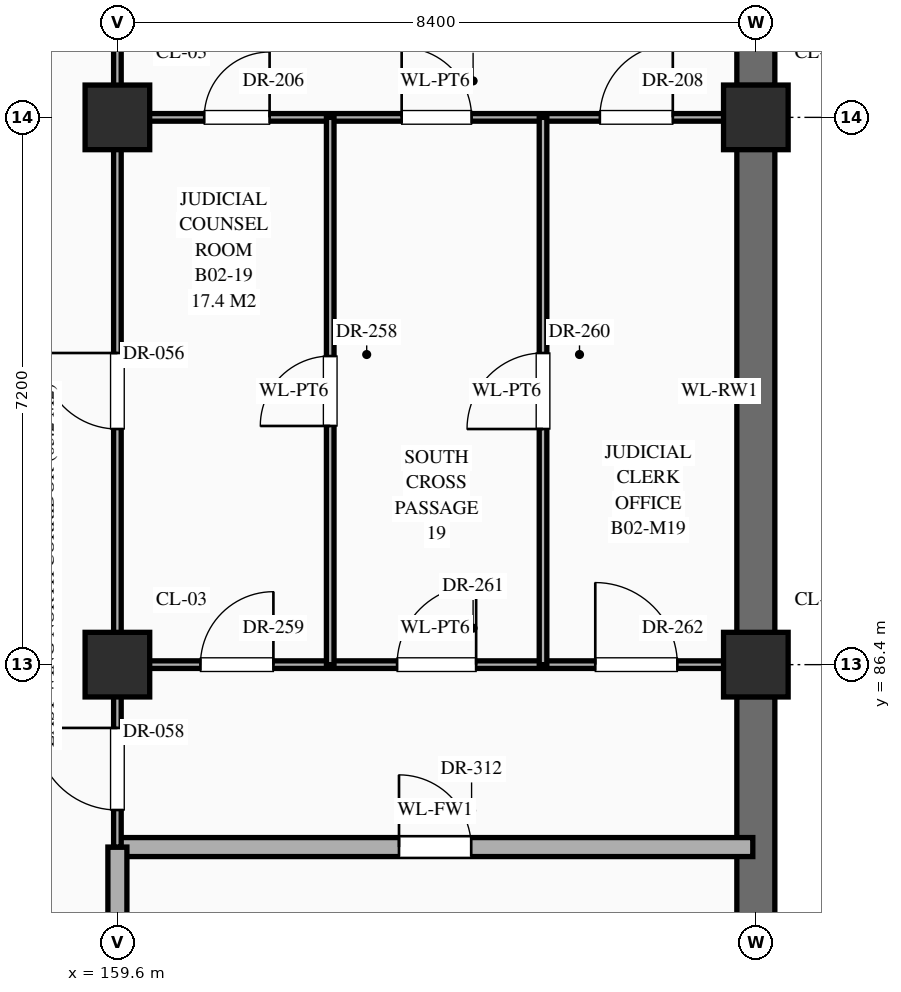
"""IFC4 building model, lengths in metres.
Left out: names, types, materials, properties, quantities, classifications, styles, units other than length and angle.
Written with IfcOpenShell. Run it as: python <this file> out.ifc"""

import sys

from ifc_helpers import new_model, si_unit, direction, frame, frame_2d, origin, origin_2d, place, context, subcontext, project, spatial, rectangle, extrude, element, fill, save


model = new_model("IFC4")
c1 = context("Model", 3, precision=1e-05, world=origin(), true_north=direction((0.0, 1.0)))
c2 = subcontext(c1, "Body", "Model", "MODEL_VIEW")
j1 = project(units=[si_unit("LENGTHUNIT", "METRE"), si_unit("PLANEANGLEUNIT", "RADIAN")], contexts=[c1])
p1 = place(None, origin())
s1 = spatial("IfcSite", under=j1, at=p1, CompositionType="ELEMENT")
p2 = place(p1, origin())
s2 = spatial("IfcBuilding", under=s1, at=p2, CompositionType="ELEMENT")
p3 = place(p2, frame((0.0, 0.0, -10.2)))
s3 = spatial("IfcBuildingStorey", under=s2, at=p3, CompositionType="ELEMENT", Elevation=-10.2)
for number, where, z_axis, x_axis in (
    (1, (159.6, 86.4, 0.0), (0.0, 0.0, 1.0), (1.0, 0.0, 0.0)),
    (2, (159.6, 93.6, 0.0), (0.0, 0.0, 1.0), (1.0, 0.0, 0.0)),
    (3, (168.0, 86.4, 0.0), (0.0, 0.0, 1.0), (1.0, 0.0, 0.0)),
    (4, (168.0, 93.6, 0.0), (0.0, 0.0, 1.0), (1.0, 0.0, 0.0)),
):
    element("IfcColumn", number, at=place(p3, frame(where, z_axis=z_axis, x_axis=x_axis)), inside=s3, PredefinedType="COLUMN", context=c2, shape_type="SweptSolid", body=[
        extrude(rectangle(XDim=0.85, YDim=0.85, at=origin_2d()), origin(), (0.0, 0.0, 1.0), 4.8),
    ])
for number, where, z_axis, x_axis in (
    (5, (168.0, 79.62, 0.0), (0.0, 0.0, 1.0), (0.0, 1.0, 0.0)),
    (6, (168.0, 86.82, 0.0), (0.0, 0.0, 1.0), (0.0, 1.0, 0.0)),
    (7, (168.0, 94.02, 0.0), (0.0, 0.0, 1.0), (0.0, 1.0, 0.0)),
):
    element("IfcWall", number, at=place(p3, frame(where, z_axis=z_axis, x_axis=x_axis)), inside=s3, PredefinedType="USERDEFINED", context=c2, shape_type="SweptSolid", body=[
        extrude(rectangle(XDim=6.36, YDim=0.5, at=frame_2d((3.18, 0.0))), origin(), (0.0, 0.0, 1.0), 4.48),
    ])
p4 = place(p3, frame((159.6, 84.0, 0.0), z_axis=(0.0, 0.0, 1.0), x_axis=(1.0, 0.0, 0.0)))
e8 = element("IfcWall", 8, at=p4, inside=s3, PredefinedType="STANDARD", context=c2, shape_type="SweptSolid", body=[
    extrude(rectangle(XDim=8.36, YDim=0.25, at=frame_2d((4.18, 0.0))), origin(), (0.0, 0.0, 1.0), 4.48),
])
p5 = place(p4, frame((3.705, 0.0, 0.0)))
e9 = element("IfcOpeningElement", 9, at=p5, cuts=e8, PredefinedType="OPENING", context=c2, shape_type="SweptSolid", body=[
    extrude(rectangle(XDim=0.95, YDim=2.15, at=frame_2d((0.475, 1.075))), frame((0.0, 0.137, 0.0), z_axis=(0.0, -1.0, 0.0), x_axis=(1.0, 0.0, 0.0)), (0.0, 0.0, 1.0), 0.274),
])
p6 = place(p3, frame((159.6, 86.4, 0.0), z_axis=(0.0, 0.0, 1.0), x_axis=(1.0, 0.0, 0.0)))
e10 = element("IfcWall", 10, at=p6, inside=s3, PredefinedType="STANDARD", context=c2, shape_type="SweptSolid", body=[
    extrude(rectangle(XDim=8.36, YDim=0.1, at=frame_2d((4.18, 0.0))), origin(), (0.0, 0.0, 1.0), 3.63),
])
p7 = place(p6, frame((1.093, 0.0, 0.0)))
e11 = element("IfcOpeningElement", 11, at=p7, cuts=e10, PredefinedType="OPENING", context=c2, shape_type="SweptSolid", body=[
    extrude(rectangle(XDim=0.96, YDim=2.2, at=frame_2d((0.48, 1.1))), frame((0.0, 0.062, 0.0), z_axis=(0.0, -1.0, 0.0), x_axis=(1.0, 0.0, 0.0)), (0.0, 0.0, 1.0), 0.124),
])
p8 = place(p6, frame((3.68, 0.0, 0.0)))
e12 = element("IfcOpeningElement", 12, at=p8, cuts=e10, PredefinedType="OPENING", context=c2, shape_type="SweptSolid", body=[
    extrude(rectangle(XDim=1.04, YDim=2.2, at=frame_2d((0.52, 1.1))), frame((0.0, 0.062, 0.0), z_axis=(0.0, -1.0, 0.0), x_axis=(1.0, 0.0, 0.0)), (0.0, 0.0, 1.0), 0.124),
])
p9 = place(p6, frame((6.288, 0.0, 0.0)))
e13 = element("IfcOpeningElement", 13, at=p9, cuts=e10, PredefinedType="OPENING", context=c2, shape_type="SweptSolid", body=[
    extrude(rectangle(XDim=1.08, YDim=2.25, at=frame_2d((0.54, 1.125))), frame((0.0, 0.062, 0.0), z_axis=(0.0, -1.0, 0.0), x_axis=(1.0, 0.0, 0.0)), (0.0, 0.0, 1.0), 0.124),
])
p10 = place(p3, frame((159.6, 93.6, 0.0), z_axis=(0.0, 0.0, 1.0), x_axis=(1.0, 0.0, 0.0)))
e14 = element("IfcWall", 14, at=p10, inside=s3, PredefinedType="STANDARD", context=c2, shape_type="SweptSolid", body=[
    extrude(rectangle(XDim=8.36, YDim=0.1, at=frame_2d((4.18, 0.0))), origin(), (0.0, 0.0, 1.0), 3.63),
])
p11 = place(p10, frame((1.143, 0.0, 0.0)))
e15 = element("IfcOpeningElement", 15, at=p11, cuts=e14, PredefinedType="OPENING", context=c2, shape_type="SweptSolid", body=[
    extrude(rectangle(XDim=0.86, YDim=2.1, at=frame_2d((0.43, 1.05))), frame((0.0, 0.062, 0.0), z_axis=(0.0, -1.0, 0.0), x_axis=(1.0, 0.0, 0.0)), (0.0, 0.0, 1.0), 0.124),
])
p12 = place(p10, frame((3.74, 0.0, 0.0)))
e16 = element("IfcOpeningElement", 16, at=p12, cuts=e14, PredefinedType="OPENING", context=c2, shape_type="SweptSolid", body=[
    extrude(rectangle(XDim=0.92, YDim=2.15, at=frame_2d((0.46, 1.075))), frame((0.0, 0.062, 0.0), z_axis=(0.0, -1.0, 0.0), x_axis=(1.0, 0.0, 0.0)), (0.0, 0.0, 1.0), 0.124),
])
p13 = place(p10, frame((6.347, 0.0, 0.0)))
e17 = element("IfcOpeningElement", 17, at=p13, cuts=e14, PredefinedType="OPENING", context=c2, shape_type="SweptSolid", body=[
    extrude(rectangle(XDim=0.96, YDim=2.2, at=frame_2d((0.48, 1.1))), frame((0.0, 0.062, 0.0), z_axis=(0.0, -1.0, 0.0), x_axis=(1.0, 0.0, 0.0)), (0.0, 0.0, 1.0), 0.124),
])
p14 = place(p3, frame((159.6, 40.8, 0.0), z_axis=(0.0, 0.0, 1.0), x_axis=(0.0, 1.0, 0.0)))
e18 = element("IfcWall", 18, at=p14, inside=s3, PredefinedType="STANDARD", context=c2, shape_type="SweptSolid", body=[
    extrude(rectangle(XDim=43.2, YDim=0.25, at=frame_2d((21.6, 0.0))), origin(), (0.0, 0.0, 1.0), 3.73),
])
p15 = place(p14, frame((0.478, 0.0, 0.0)))
e19 = element("IfcOpeningElement", 19, at=p15, cuts=e18, PredefinedType="OPENING", context=c2, shape_type="SweptSolid", body=[
    extrude(rectangle(XDim=1.1, YDim=2.2, at=frame_2d((0.55, 1.1))), frame((0.0, 0.137, 0.0), z_axis=(0.0, -1.0, 0.0), x_axis=(1.0, 0.0, 0.0)), (0.0, 0.0, 1.0), 0.274),
])
p16 = place(p14, frame((40.472, 0.0, 0.0)))
e20 = element("IfcOpeningElement", 20, at=p16, cuts=e18, PredefinedType="OPENING", context=c2, shape_type="SweptSolid", body=[
    extrude(rectangle(XDim=1.0, YDim=2.2, at=frame_2d((0.5, 1.1))), frame((0.0, 0.137, 0.0), z_axis=(0.0, -1.0, 0.0), x_axis=(1.0, 0.0, 0.0)), (0.0, 0.0, 1.0), 0.274),
])
p17 = place(p14, frame((27.05, 0.0, 0.0)))
e21 = element("IfcOpeningElement", 21, at=p17, cuts=e18, PredefinedType="OPENING", context=c2, shape_type="SweptSolid", body=[
    extrude(rectangle(XDim=1.1, YDim=2.2, at=frame_2d((0.55, 1.1))), frame((0.0, 0.137, 0.0), z_axis=(0.0, -1.0, 0.0), x_axis=(1.0, 0.0, 0.0)), (0.0, 0.0, 1.0), 0.274),
])
p18 = place(p14, frame((12.65, 0.0, 0.0)))
e22 = element("IfcOpeningElement", 22, at=p18, cuts=e18, PredefinedType="OPENING", context=c2, shape_type="SweptSolid", body=[
    extrude(rectangle(XDim=1.1, YDim=2.2, at=frame_2d((0.55, 1.1))), frame((0.0, 0.137, 0.0), z_axis=(0.0, -1.0, 0.0), x_axis=(1.0, 0.0, 0.0)), (0.0, 0.0, 1.0), 0.274),
])
p19 = place(p3, frame((159.6, 84.0, 0.0), z_axis=(0.0, 0.0, 1.0), x_axis=(0.0, 1.0, 0.0)))
e23 = element("IfcWall", 23, at=p19, inside=s3, PredefinedType="STANDARD", context=c2, shape_type="SweptSolid", body=[
    extrude(rectangle(XDim=24.0, YDim=0.1, at=frame_2d((12.0, 0.0))), origin(), (0.0, 0.0, 1.0), 3.73),
])
p20 = place(p19, frame((17.722, 0.0, 0.0)))
e24 = element("IfcOpeningElement", 24, at=p20, cuts=e23, PredefinedType="OPENING", context=c2, shape_type="SweptSolid", body=[
    extrude(rectangle(XDim=0.9, YDim=2.15, at=frame_2d((0.45, 1.075))), frame((0.0, 0.062, 0.0), z_axis=(0.0, -1.0, 0.0), x_axis=(1.0, 0.0, 0.0)), (0.0, 0.0, 1.0), 0.124),
])
p21 = place(p19, frame((20.998, 0.0, 0.0)))
e25 = element("IfcOpeningElement", 25, at=p21, cuts=e23, PredefinedType="OPENING", context=c2, shape_type="SweptSolid", body=[
    extrude(rectangle(XDim=0.86, YDim=2.1, at=frame_2d((0.43, 1.05))), frame((0.0, 0.062, 0.0), z_axis=(0.0, -1.0, 0.0), x_axis=(1.0, 0.0, 0.0)), (0.0, 0.0, 1.0), 0.124),
])
p22 = place(p19, frame((10.512, 0.0, 0.0)))
e26 = element("IfcOpeningElement", 26, at=p22, cuts=e23, PredefinedType="OPENING", context=c2, shape_type="SweptSolid", body=[
    extrude(rectangle(XDim=0.92, YDim=2.15, at=frame_2d((0.46, 1.075))), frame((0.0, 0.062, 0.0), z_axis=(0.0, -1.0, 0.0), x_axis=(1.0, 0.0, 0.0)), (0.0, 0.0, 1.0), 0.124),
])
p23 = place(p19, frame((13.748, 0.0, 0.0)))
e27 = element("IfcOpeningElement", 27, at=p23, cuts=e23, PredefinedType="OPENING", context=c2, shape_type="SweptSolid", body=[
    extrude(rectangle(XDim=0.96, YDim=2.2, at=frame_2d((0.48, 1.1))), frame((0.0, 0.062, 0.0), z_axis=(0.0, -1.0, 0.0), x_axis=(1.0, 0.0, 0.0)), (0.0, 0.0, 1.0), 0.124),
])
p24 = place(p19, frame((5.5, 0.0, 0.0)))
e28 = element("IfcOpeningElement", 28, at=p24, cuts=e23, PredefinedType="OPENING", context=c2, shape_type="SweptSolid", body=[
    extrude(rectangle(XDim=1.0, YDim=2.25, at=frame_2d((0.5, 1.125))), frame((0.0, 0.062, 0.0), z_axis=(0.0, -1.0, 0.0), x_axis=(1.0, 0.0, 0.0)), (0.0, 0.0, 1.0), 0.124),
])
p25 = place(p19, frame((0.488, 0.0, 0.0)))
e29 = element("IfcOpeningElement", 29, at=p25, cuts=e23, PredefinedType="OPENING", context=c2, shape_type="SweptSolid", body=[
    extrude(rectangle(XDim=1.08, YDim=2.25, at=frame_2d((0.54, 1.125))), frame((0.0, 0.062, 0.0), z_axis=(0.0, -1.0, 0.0), x_axis=(1.0, 0.0, 0.0)), (0.0, 0.0, 1.0), 0.124),
])
p26 = place(p3, frame((162.4, 86.4, 0.0), z_axis=(0.0, 0.0, 1.0), x_axis=(0.0, 1.0, 0.0)))
e30 = element("IfcWall", 30, at=p26, inside=s3, PredefinedType="STANDARD", context=c2, shape_type="SweptSolid", body=[
    extrude(rectangle(XDim=7.2, YDim=0.1, at=frame_2d((3.6, 0.0))), origin(), (0.0, 0.0, 1.0), 4.48),
])
p27 = place(p26, frame((3.14, 0.0, 0.0)))
e31 = element("IfcOpeningElement", 31, at=p27, cuts=e30, PredefinedType="OPENING", context=c2, shape_type="SweptSolid", body=[
    extrude(rectangle(XDim=0.92, YDim=2.15, at=frame_2d((0.46, 1.075))), frame((0.0, 0.062, 0.0), z_axis=(0.0, -1.0, 0.0), x_axis=(1.0, 0.0, 0.0)), (0.0, 0.0, 1.0), 0.124),
])
p28 = place(p3, frame((165.2, 86.4, 0.0), z_axis=(0.0, 0.0, 1.0), x_axis=(0.0, 1.0, 0.0)))
e32 = element("IfcWall", 32, at=p28, inside=s3, PredefinedType="STANDARD", context=c2, shape_type="SweptSolid", body=[
    extrude(rectangle(XDim=7.2, YDim=0.1, at=frame_2d((3.6, 0.0))), origin(), (0.0, 0.0, 1.0), 4.48),
])
p29 = place(p28, frame((3.1, 0.0, 0.0)))
e33 = element("IfcOpeningElement", 33, at=p29, cuts=e32, PredefinedType="OPENING", context=c2, shape_type="SweptSolid", body=[
    extrude(rectangle(XDim=1.0, YDim=2.25, at=frame_2d((0.5, 1.125))), frame((0.0, 0.062, 0.0), z_axis=(0.0, -1.0, 0.0), x_axis=(1.0, 0.0, 0.0)), (0.0, 0.0, 1.0), 0.124),
])
p30 = place(p24, origin())
e34 = element("IfcDoor", 34, at=p30, inside=s3, OperationType="SINGLE_SWING_RIGHT", PredefinedType="DOOR", context=c2, shape_type="SweptSolid", body=[
    extrude(rectangle(XDim=1.0, YDim=2.25, at=frame_2d((0.5, 1.125))), frame((0.0, 0.025, 0.0), z_axis=(0.0, -1.0, 0.0), x_axis=(1.0, 0.0, 0.0)), (0.0, 0.0, 1.0), 0.05),
])
fill(e28, e34)
p31 = place(p25, origin())
e35 = element("IfcDoor", 35, at=p31, inside=s3, OperationType="SINGLE_SWING_RIGHT", PredefinedType="DOOR", context=c2, shape_type="SweptSolid", body=[
    extrude(rectangle(XDim=1.08, YDim=2.25, at=frame_2d((0.54, 1.125))), frame((0.0, 0.025, 0.0), z_axis=(0.0, -1.0, 0.0), x_axis=(1.0, 0.0, 0.0)), (0.0, 0.0, 1.0), 0.05),
])
fill(e29, e35)
p32 = place(p11, origin())
e36 = element("IfcDoor", 36, at=p32, inside=s3, OperationType="SINGLE_SWING_RIGHT", PredefinedType="DOOR", context=c2, shape_type="SweptSolid", body=[
    extrude(rectangle(XDim=0.86, YDim=2.1, at=frame_2d((0.43, 1.05))), frame((0.0, 0.025, 0.0), z_axis=(0.0, -1.0, 0.0), x_axis=(1.0, 0.0, 0.0)), (0.0, 0.0, 1.0), 0.05),
])
fill(e15, e36)
p33 = place(p12, origin())
e37 = element("IfcDoor", 37, at=p33, inside=s3, OperationType="SINGLE_SWING_LEFT", PredefinedType="DOOR", context=c2, shape_type="SweptSolid", body=[
    extrude(rectangle(XDim=0.92, YDim=2.15, at=frame_2d((0.46, 1.075))), frame((0.0, 0.025, 0.0), z_axis=(0.0, -1.0, 0.0), x_axis=(1.0, 0.0, 0.0)), (0.0, 0.0, 1.0), 0.05),
])
fill(e16, e37)
p34 = place(p13, origin())
e38 = element("IfcDoor", 38, at=p34, inside=s3, OperationType="SINGLE_SWING_RIGHT", PredefinedType="DOOR", context=c2, shape_type="SweptSolid", body=[
    extrude(rectangle(XDim=0.96, YDim=2.2, at=frame_2d((0.48, 1.1))), frame((0.0, 0.025, 0.0), z_axis=(0.0, -1.0, 0.0), x_axis=(1.0, 0.0, 0.0)), (0.0, 0.0, 1.0), 0.05),
])
fill(e17, e38)
p35 = place(p27, origin())
e39 = element("IfcDoor", 39, at=p35, inside=s3, OperationType="SINGLE_SWING_LEFT", PredefinedType="DOOR", context=c2, shape_type="SweptSolid", body=[
    extrude(rectangle(XDim=0.92, YDim=2.15, at=frame_2d((0.46, 1.075))), frame((0.0, 0.025, 0.0), z_axis=(0.0, -1.0, 0.0), x_axis=(1.0, 0.0, 0.0)), (0.0, 0.0, 1.0), 0.05),
])
fill(e31, e39)
p36 = place(p7, origin())
e40 = element("IfcDoor", 40, at=p36, inside=s3, OperationType="SINGLE_SWING_RIGHT", PredefinedType="DOOR", context=c2, shape_type="SweptSolid", body=[
    extrude(rectangle(XDim=0.96, YDim=2.2, at=frame_2d((0.48, 1.1))), frame((0.0, 0.025, 0.0), z_axis=(0.0, -1.0, 0.0), x_axis=(1.0, 0.0, 0.0)), (0.0, 0.0, 1.0), 0.05),
])
fill(e11, e40)
p37 = place(p29, origin())
e41 = element("IfcDoor", 41, at=p37, inside=s3, OperationType="SINGLE_SWING_LEFT", PredefinedType="DOOR", context=c2, shape_type="SweptSolid", body=[
    extrude(rectangle(XDim=1.0, YDim=2.25, at=frame_2d((0.5, 1.125))), frame((0.0, 0.025, 0.0), z_axis=(0.0, -1.0, 0.0), x_axis=(1.0, 0.0, 0.0)), (0.0, 0.0, 1.0), 0.05),
])
fill(e33, e41)
p38 = place(p8, origin())
e42 = element("IfcDoor", 42, at=p38, inside=s3, OperationType="SINGLE_SWING_RIGHT", PredefinedType="DOOR", context=c2, shape_type="SweptSolid", body=[
    extrude(rectangle(XDim=1.04, YDim=2.2, at=frame_2d((0.52, 1.1))), frame((0.0, 0.025, 0.0), z_axis=(0.0, -1.0, 0.0), x_axis=(1.0, 0.0, 0.0)), (0.0, 0.0, 1.0), 0.05),
])
fill(e12, e42)
p39 = place(p9, origin())
e43 = element("IfcDoor", 43, at=p39, inside=s3, OperationType="SINGLE_SWING_LEFT", PredefinedType="DOOR", context=c2, shape_type="SweptSolid", body=[
    extrude(rectangle(XDim=1.08, YDim=2.25, at=frame_2d((0.54, 1.125))), frame((0.0, 0.025, 0.0), z_axis=(0.0, -1.0, 0.0), x_axis=(1.0, 0.0, 0.0)), (0.0, 0.0, 1.0), 0.05),
])
fill(e13, e43)
p40 = place(p5, origin())
e44 = element("IfcDoor", 44, at=p40, inside=s3, OperationType="SINGLE_SWING_LEFT", PredefinedType="DOOR", context=c2, shape_type="SweptSolid", body=[
    extrude(rectangle(XDim=0.95, YDim=2.15, at=frame_2d((0.475, 1.075))), frame((0.0, 0.025, 0.0), z_axis=(0.0, -1.0, 0.0), x_axis=(1.0, 0.0, 0.0)), (0.0, 0.0, 1.0), 0.05),
])
fill(e9, e44)
save(model, sys.argv[1])
